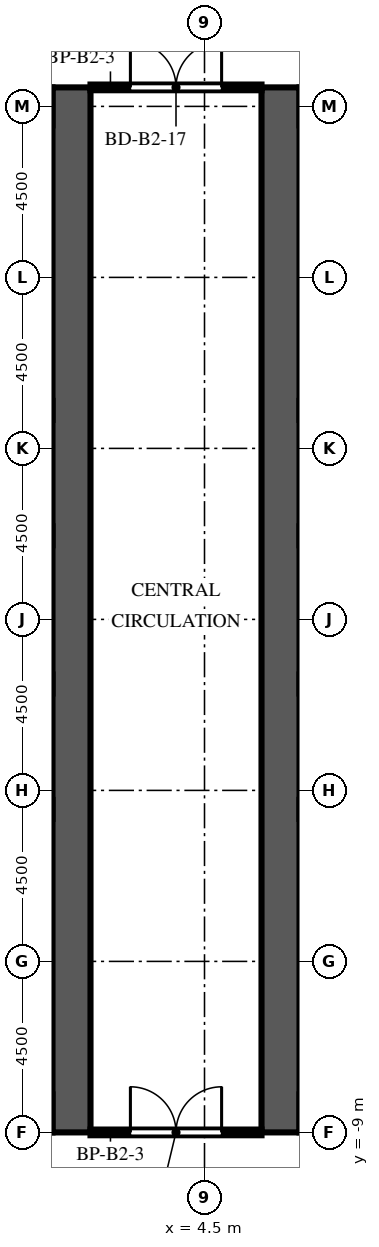
"""IFC4 building model, lengths in metres.
Left out: names, types, materials, properties, quantities, classifications, styles, units other than length and angle.
Written with IfcOpenShell. Run it as: python <this file> out.ifc"""

import sys

from ifc_helpers import new_model, si_unit, direction, frame, frame_2d, origin, place, context, subcontext, project, spatial, rectangle, extrude, element, fill, save


model = new_model("IFC4")
c1 = context("Model", 3, precision=1e-05, world=origin(), true_north=direction((0.0, 1.0)))
c2 = subcontext(c1, "Body", "Model", "MODEL_VIEW")
j1 = project(units=[si_unit("LENGTHUNIT", "METRE"), si_unit("PLANEANGLEUNIT", "RADIAN")], contexts=[c1])
p1 = place(None, origin())
s1 = spatial("IfcSite", under=j1, at=p1, CompositionType="ELEMENT")
p2 = place(p1, origin())
s2 = spatial("IfcBuilding", under=s1, at=p2, CompositionType="ELEMENT")
p3 = place(p2, frame((0.0, 0.0, -10.0)))
s3 = spatial("IfcBuildingStorey", under=s2, at=p3, CompositionType="ELEMENT", Elevation=-10.0)
p4 = place(p3, frame((1.0, -9.0, 0.0), z_axis=(0.0, 0.0, 1.0), x_axis=(0.0, 1.0, 0.0)))
e1 = element("IfcWall", 1, at=p4, inside=s3, PredefinedType="SHEAR", context=c2, shape_type="SweptSolid", body=[
    extrude(rectangle(XDim=27.5, YDim=1.0, at=frame_2d((13.75, 0.0))), origin(), (0.0, 0.0, 1.0), 5.0),
])
p5 = place(p4, frame((12.55, 0.0, 0.0)))
e2 = element("IfcOpeningElement", 2, at=p5, cuts=e1, PredefinedType="OPENING", context=c2, shape_type="SweptSolid", body=[
    extrude(rectangle(XDim=2.4, YDim=2.4, at=frame_2d((1.2, 1.2))), frame((0.0, 0.51, 0.0), z_axis=(0.0, -1.0, 0.0), x_axis=(1.0, 0.0, 0.0)), (0.0, 0.0, 1.0), 1.02),
])
p6 = place(p4, frame((4.025, 0.0, 0.0)))
e3 = element("IfcOpeningElement", 3, at=p6, cuts=e1, PredefinedType="OPENING", context=c2, shape_type="SweptSolid", body=[
    extrude(rectangle(XDim=1.2, YDim=2.1, at=frame_2d((0.6, 1.05))), frame((0.0, 0.51, 0.0), z_axis=(0.0, -1.0, 0.0), x_axis=(1.0, 0.0, 0.0)), (0.0, 0.0, 1.0), 1.02),
])
p7 = place(p4, frame((19.475, 0.0, 0.0)))
e4 = element("IfcOpeningElement", 4, at=p7, cuts=e1, PredefinedType="OPENING", context=c2, shape_type="SweptSolid", body=[
    extrude(rectangle(XDim=1.0, YDim=2.1, at=frame_2d((0.5, 1.05))), frame((0.0, 0.51, 0.0), z_axis=(0.0, -1.0, 0.0), x_axis=(1.0, 0.0, 0.0)), (0.0, 0.0, 1.0), 1.02),
])
p8 = place(p4, frame((21.106, 0.0, 0.0)))
e5 = element("IfcOpeningElement", 5, at=p8, cuts=e1, PredefinedType="OPENING", context=c2, shape_type="SweptSolid", body=[
    extrude(rectangle(XDim=1.0, YDim=2.1, at=frame_2d((0.5, 1.05))), frame((0.0, 0.51, 0.0), z_axis=(0.0, -1.0, 0.0), x_axis=(1.0, 0.0, 0.0)), (0.0, 0.0, 1.0), 1.02),
])
p9 = place(p4, frame((23.1, 0.0, 0.0)))
e6 = element("IfcOpeningElement", 6, at=p9, cuts=e1, PredefinedType="OPENING", context=c2, shape_type="SweptSolid", body=[
    extrude(rectangle(XDim=1.0, YDim=2.1, at=frame_2d((0.5, 1.05))), frame((0.0, 0.51, 0.0), z_axis=(0.0, -1.0, 0.0), x_axis=(1.0, 0.0, 0.0)), (0.0, 0.0, 1.0), 1.02),
])
p10 = place(p4, frame((25.094, 0.0, 0.0)))
e7 = element("IfcOpeningElement", 7, at=p10, cuts=e1, PredefinedType="OPENING", context=c2, shape_type="SweptSolid", body=[
    extrude(rectangle(XDim=1.0, YDim=2.1, at=frame_2d((0.5, 1.05))), frame((0.0, 0.51, 0.0), z_axis=(0.0, -1.0, 0.0), x_axis=(1.0, 0.0, 0.0)), (0.0, 0.0, 1.0), 1.02),
])
p11 = place(p3, frame((6.5, -9.0, 0.0), z_axis=(0.0, 0.0, 1.0), x_axis=(0.0, 1.0, 0.0)))
e8 = element("IfcWall", 8, at=p11, inside=s3, PredefinedType="SHEAR", context=c2, shape_type="SweptSolid", body=[
    extrude(rectangle(XDim=27.5, YDim=1.0, at=frame_2d((13.75, 0.0))), origin(), (0.0, 0.0, 1.0), 5.0),
])
p12 = place(p11, frame((12.55, 0.0, 0.0)))
e9 = element("IfcOpeningElement", 9, at=p12, cuts=e8, PredefinedType="OPENING", context=c2, shape_type="SweptSolid", body=[
    extrude(rectangle(XDim=2.4, YDim=2.4, at=frame_2d((1.2, 1.2))), frame((0.0, 0.51, 0.0), z_axis=(0.0, -1.0, 0.0), x_axis=(1.0, 0.0, 0.0)), (0.0, 0.0, 1.0), 1.02),
])
p13 = place(p11, frame((4.025, 0.0, 0.0)))
e10 = element("IfcOpeningElement", 10, at=p13, cuts=e8, PredefinedType="OPENING", context=c2, shape_type="SweptSolid", body=[
    extrude(rectangle(XDim=1.2, YDim=2.1, at=frame_2d((0.6, 1.05))), frame((0.0, 0.51, 0.0), z_axis=(0.0, -1.0, 0.0), x_axis=(1.0, 0.0, 0.0)), (0.0, 0.0, 1.0), 1.02),
])
p14 = place(p11, frame((19.475, 0.0, 0.0)))
e11 = element("IfcOpeningElement", 11, at=p14, cuts=e8, PredefinedType="OPENING", context=c2, shape_type="SweptSolid", body=[
    extrude(rectangle(XDim=1.0, YDim=2.1, at=frame_2d((0.5, 1.05))), frame((0.0, 0.51, 0.0), z_axis=(0.0, -1.0, 0.0), x_axis=(1.0, 0.0, 0.0)), (0.0, 0.0, 1.0), 1.02),
])
p15 = place(p11, frame((21.106, 0.0, 0.0)))
e12 = element("IfcOpeningElement", 12, at=p15, cuts=e8, PredefinedType="OPENING", context=c2, shape_type="SweptSolid", body=[
    extrude(rectangle(XDim=1.0, YDim=2.1, at=frame_2d((0.5, 1.05))), frame((0.0, 0.51, 0.0), z_axis=(0.0, -1.0, 0.0), x_axis=(1.0, 0.0, 0.0)), (0.0, 0.0, 1.0), 1.02),
])
p16 = place(p11, frame((23.1, 0.0, 0.0)))
e13 = element("IfcOpeningElement", 13, at=p16, cuts=e8, PredefinedType="OPENING", context=c2, shape_type="SweptSolid", body=[
    extrude(rectangle(XDim=1.0, YDim=2.1, at=frame_2d((0.5, 1.05))), frame((0.0, 0.51, 0.0), z_axis=(0.0, -1.0, 0.0), x_axis=(1.0, 0.0, 0.0)), (0.0, 0.0, 1.0), 1.02),
])
p17 = place(p11, frame((25.094, 0.0, 0.0)))
e14 = element("IfcOpeningElement", 14, at=p17, cuts=e8, PredefinedType="OPENING", context=c2, shape_type="SweptSolid", body=[
    extrude(rectangle(XDim=1.0, YDim=2.1, at=frame_2d((0.5, 1.05))), frame((0.0, 0.51, 0.0), z_axis=(0.0, -1.0, 0.0), x_axis=(1.0, 0.0, 0.0)), (0.0, 0.0, 1.0), 1.02),
])
p18 = place(p3, frame((1.5, -9.0, 0.0), z_axis=(0.0, 0.0, 1.0), x_axis=(1.0, 0.0, 0.0)))
e15 = element("IfcWall", 15, at=p18, inside=s3, PredefinedType="PARTITIONING", context=c2, shape_type="SweptSolid", body=[
    extrude(rectangle(XDim=4.5, YDim=0.15, at=frame_2d((2.25, 0.0))), origin(), (0.0, 0.0, 1.0), 4.6),
])
p19 = place(p18, frame((1.05, 0.0, 0.0)))
e16 = element("IfcOpeningElement", 16, at=p19, cuts=e15, PredefinedType="OPENING", context=c2, shape_type="SweptSolid", body=[
    extrude(rectangle(XDim=2.4, YDim=2.4, at=frame_2d((1.2, 1.2))), frame((0.0, 0.085, 0.0), z_axis=(0.0, -1.0, 0.0), x_axis=(1.0, 0.0, 0.0)), (0.0, 0.0, 1.0), 0.17),
])
p20 = place(p3, frame((1.5, 18.5, 0.0), z_axis=(0.0, 0.0, 1.0), x_axis=(1.0, 0.0, 0.0)))
e17 = element("IfcWall", 17, at=p20, inside=s3, PredefinedType="PARTITIONING", context=c2, shape_type="SweptSolid", body=[
    extrude(rectangle(XDim=4.5, YDim=0.15, at=frame_2d((2.25, 0.0))), origin(), (0.0, 0.0, 1.0), 4.6),
])
p21 = place(p20, frame((1.05, 0.0, 0.0)))
e18 = element("IfcOpeningElement", 18, at=p21, cuts=e17, PredefinedType="OPENING", context=c2, shape_type="SweptSolid", body=[
    extrude(rectangle(XDim=2.4, YDim=2.4, at=frame_2d((1.2, 1.2))), frame((0.0, 0.085, 0.0), z_axis=(0.0, -1.0, 0.0), x_axis=(1.0, 0.0, 0.0)), (0.0, 0.0, 1.0), 0.17),
])
p22 = place(p5, origin())
e19 = element("IfcDoor", 19, at=p22, inside=s3, OperationType="DOUBLE_DOOR_DOUBLE_SWING", PredefinedType="DOOR", context=c2, shape_type="SweptSolid", body=[
    extrude(rectangle(XDim=2.4, YDim=2.4, at=frame_2d((1.2, 1.2))), frame((0.0, 0.025, 0.0), z_axis=(0.0, -1.0, 0.0), x_axis=(1.0, 0.0, 0.0)), (0.0, 0.0, 1.0), 0.05),
])
fill(e2, e19)
p23 = place(p12, origin())
e20 = element("IfcDoor", 20, at=p23, inside=s3, OperationType="DOUBLE_DOOR_DOUBLE_SWING", PredefinedType="DOOR", context=c2, shape_type="SweptSolid", body=[
    extrude(rectangle(XDim=2.4, YDim=2.4, at=frame_2d((1.2, 1.2))), frame((0.0, 0.025, 0.0), z_axis=(0.0, -1.0, 0.0), x_axis=(1.0, 0.0, 0.0)), (0.0, 0.0, 1.0), 0.05),
])
fill(e9, e20)
p24 = place(p6, origin())
e21 = element("IfcDoor", 21, at=p24, inside=s3, OperationType="SINGLE_SWING_LEFT", PredefinedType="DOOR", context=c2, shape_type="SweptSolid", body=[
    extrude(rectangle(XDim=1.2, YDim=2.1, at=frame_2d((0.6, 1.05))), frame((0.0, 0.475, 0.0), z_axis=(0.0, -1.0, 0.0), x_axis=(1.0, 0.0, 0.0)), (0.0, 0.0, 1.0), 0.05),
])
fill(e3, e21)
p25 = place(p7, origin())
e22 = element("IfcDoor", 22, at=p25, inside=s3, OperationType="SINGLE_SWING_LEFT", PredefinedType="DOOR", context=c2, shape_type="SweptSolid", body=[
    extrude(rectangle(XDim=1.0, YDim=2.1, at=frame_2d((0.5, 1.05))), frame((0.0, 0.475, 0.0), z_axis=(0.0, -1.0, 0.0), x_axis=(1.0, 0.0, 0.0)), (0.0, 0.0, 1.0), 0.05),
])
fill(e4, e22)
p26 = place(p8, origin())
e23 = element("IfcDoor", 23, at=p26, inside=s3, OperationType="SINGLE_SWING_RIGHT", PredefinedType="DOOR", context=c2, shape_type="SweptSolid", body=[
    extrude(rectangle(XDim=1.0, YDim=2.1, at=frame_2d((0.5, 1.05))), frame((0.0, 0.475, 0.0), z_axis=(0.0, -1.0, 0.0), x_axis=(1.0, 0.0, 0.0)), (0.0, 0.0, 1.0), 0.05),
])
fill(e5, e23)
p27 = place(p9, origin())
e24 = element("IfcDoor", 24, at=p27, inside=s3, OperationType="SINGLE_SWING_LEFT", PredefinedType="DOOR", context=c2, shape_type="SweptSolid", body=[
    extrude(rectangle(XDim=1.0, YDim=2.1, at=frame_2d((0.5, 1.05))), frame((0.0, 0.475, 0.0), z_axis=(0.0, -1.0, 0.0), x_axis=(1.0, 0.0, 0.0)), (0.0, 0.0, 1.0), 0.05),
])
fill(e6, e24)
p28 = place(p10, origin())
e25 = element("IfcDoor", 25, at=p28, inside=s3, OperationType="SINGLE_SWING_RIGHT", PredefinedType="DOOR", context=c2, shape_type="SweptSolid", body=[
    extrude(rectangle(XDim=1.0, YDim=2.1, at=frame_2d((0.5, 1.05))), frame((0.0, 0.475, 0.0), z_axis=(0.0, -1.0, 0.0), x_axis=(1.0, 0.0, 0.0)), (0.0, 0.0, 1.0), 0.05),
])
fill(e7, e25)
p29 = place(p13, origin())
e26 = element("IfcDoor", 26, at=p29, inside=s3, OperationType="SINGLE_SWING_RIGHT", PredefinedType="DOOR", context=c2, shape_type="SweptSolid", body=[
    extrude(rectangle(XDim=1.2, YDim=2.1, at=frame_2d((0.6, 1.05))), frame((0.0, -0.425, 0.0), z_axis=(0.0, -1.0, 0.0), x_axis=(1.0, 0.0, 0.0)), (0.0, 0.0, 1.0), 0.05),
])
fill(e10, e26)
p30 = place(p14, origin())
e27 = element("IfcDoor", 27, at=p30, inside=s3, OperationType="SINGLE_SWING_RIGHT", PredefinedType="DOOR", context=c2, shape_type="SweptSolid", body=[
    extrude(rectangle(XDim=1.0, YDim=2.1, at=frame_2d((0.5, 1.05))), frame((0.0, -0.425, 0.0), z_axis=(0.0, -1.0, 0.0), x_axis=(1.0, 0.0, 0.0)), (0.0, 0.0, 1.0), 0.05),
])
fill(e11, e27)
p31 = place(p15, origin())
e28 = element("IfcDoor", 28, at=p31, inside=s3, OperationType="SINGLE_SWING_LEFT", PredefinedType="DOOR", context=c2, shape_type="SweptSolid", body=[
    extrude(rectangle(XDim=1.0, YDim=2.1, at=frame_2d((0.5, 1.05))), frame((0.0, -0.425, 0.0), z_axis=(0.0, -1.0, 0.0), x_axis=(1.0, 0.0, 0.0)), (0.0, 0.0, 1.0), 0.05),
])
fill(e12, e28)
p32 = place(p16, origin())
e29 = element("IfcDoor", 29, at=p32, inside=s3, OperationType="SINGLE_SWING_RIGHT", PredefinedType="DOOR", context=c2, shape_type="SweptSolid", body=[
    extrude(rectangle(XDim=1.0, YDim=2.1, at=frame_2d((0.5, 1.05))), frame((0.0, -0.425, 0.0), z_axis=(0.0, -1.0, 0.0), x_axis=(1.0, 0.0, 0.0)), (0.0, 0.0, 1.0), 0.05),
])
fill(e13, e29)
p33 = place(p17, origin())
e30 = element("IfcDoor", 30, at=p33, inside=s3, OperationType="SINGLE_SWING_LEFT", PredefinedType="DOOR", context=c2, shape_type="SweptSolid", body=[
    extrude(rectangle(XDim=1.0, YDim=2.1, at=frame_2d((0.5, 1.05))), frame((0.0, -0.425, 0.0), z_axis=(0.0, -1.0, 0.0), x_axis=(1.0, 0.0, 0.0)), (0.0, 0.0, 1.0), 0.05),
])
fill(e14, e30)
p34 = place(p19, origin())
e31 = element("IfcDoor", 31, at=p34, inside=s3, OperationType="DOUBLE_DOOR_DOUBLE_SWING", PredefinedType="DOOR", context=c2, shape_type="SweptSolid", body=[
    extrude(rectangle(XDim=2.4, YDim=2.4, at=frame_2d((1.2, 1.2))), frame((0.0, 0.025, 0.0), z_axis=(0.0, -1.0, 0.0), x_axis=(1.0, 0.0, 0.0)), (0.0, 0.0, 1.0), 0.05),
])
fill(e16, e31)
p35 = place(p21, origin())
e32 = element("IfcDoor", 32, at=p35, inside=s3, OperationType="DOUBLE_DOOR_DOUBLE_SWING", PredefinedType="DOOR", context=c2, shape_type="SweptSolid", body=[
    extrude(rectangle(XDim=2.4, YDim=2.4, at=frame_2d((1.2, 1.2))), frame((0.0, 0.025, 0.0), z_axis=(0.0, -1.0, 0.0), x_axis=(1.0, 0.0, 0.0)), (0.0, 0.0, 1.0), 0.05),
])
fill(e18, e32)
save(model, sys.argv[1])
